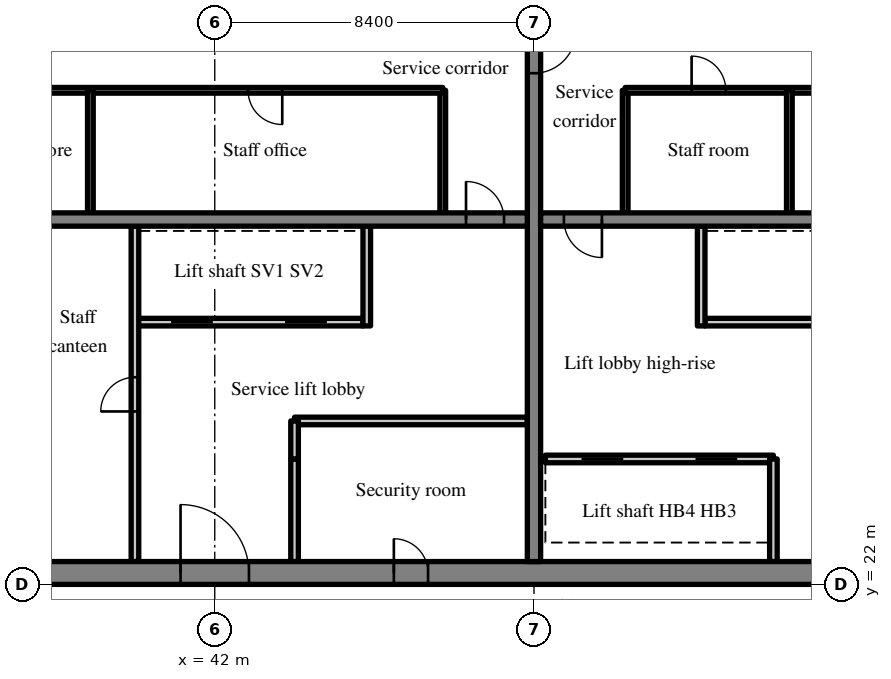
"""IFC4 building model, lengths in metres.
Left out: names, types, materials, properties, quantities, classifications, styles, units other than length and angle.
Written with IfcOpenShell. Run it as: python <this file> out.ifc"""

import sys

from ifc_helpers import new_model, si_unit, direction, frame, frame_2d, origin, place, context, subcontext, project, spatial, rectangle, extrude, source, transform, mapped, element, fill, save


model = new_model("IFC4")
c1 = context("Model", 3, precision=1e-05, world=origin(), true_north=direction((0.0, 1.0)))
c2 = subcontext(c1, "Body", "Model", "MODEL_VIEW")
j1 = project(units=[si_unit("LENGTHUNIT", "METRE"), si_unit("PLANEANGLEUNIT", "RADIAN")], contexts=[c1])
p1 = place(None, origin())
s1 = spatial("IfcSite", under=j1, at=p1, CompositionType="ELEMENT")
p2 = place(p1, origin())
s2 = spatial("IfcBuilding", under=s1, at=p2, CompositionType="ELEMENT")
p3 = place(p2, frame((0.0, 0.0, 221.8)))
s3 = spatial("IfcBuildingStorey", under=s2, at=p3, CompositionType="ELEMENT", Elevation=221.8)
m1 = source(origin(), c2, "Body", "SweptSolid", [
    extrude(rectangle(XDim=50.4, YDim=0.6, at=frame_2d((25.2, 0.0))), origin(), (0.0, 0.0, 1.0), 3.62),
])
p4 = place(p3, frame((25.2, 22.3, 0.0), z_axis=(0.0, 0.0, 1.0), x_axis=(1.0, 0.0, 0.0)))
e1 = element("IfcWall", 1, at=p4, inside=s3, PredefinedType="SHEAR", context=c2, shape_type="MappedRepresentation", body=[
    mapped(m1, transform((0.0, 0.0, 0.0), scale=1.0)),
])
m2 = source(origin(), c2, "Body", "SweptSolid", [
    extrude(rectangle(XDim=1.8, YDim=2.1, at=frame_2d((0.9, 1.05))), frame((0.0, 0.31, 0.0), z_axis=(0.0, -1.0, 0.0), x_axis=(1.0, 0.0, 0.0)), (0.0, 0.0, 1.0), 0.62),
])
p5 = place(p4, frame((15.9, 0.0, 0.0)))
e2 = element("IfcOpeningElement", 2, at=p5, cuts=e1, PredefinedType="OPENING", context=c2, shape_type="MappedRepresentation", body=[
    mapped(m2, transform((0.0, 0.0, 0.0), scale=1.0)),
])
m3 = source(origin(), c2, "Body", "SweptSolid", [
    extrude(rectangle(XDim=0.9, YDim=2.1, at=frame_2d((0.45, 1.05))), frame((0.0, 0.31, 0.0), z_axis=(0.0, -1.0, 0.0), x_axis=(1.0, 0.0, 0.0)), (0.0, 0.0, 1.0), 0.62),
])
p6 = place(p4, frame((9.687, 0.0, 0.0)))
e3 = element("IfcOpeningElement", 3, at=p6, cuts=e1, PredefinedType="OPENING", context=c2, shape_type="MappedRepresentation", body=[
    mapped(m3, transform((0.0, 0.0, 0.0), scale=1.0)),
])
p7 = place(p4, frame((21.513, 0.0, 0.0)))
e4 = element("IfcOpeningElement", 4, at=p7, cuts=e1, PredefinedType="OPENING", context=c2, shape_type="MappedRepresentation", body=[
    mapped(m3, transform((0.0, 0.0, 0.0), scale=1.0)),
])
p8 = place(p4, frame((32.7, 0.0, 0.0)))
e5 = element("IfcOpeningElement", 5, at=p8, cuts=e1, PredefinedType="OPENING", context=c2, shape_type="MappedRepresentation", body=[
    mapped(m2, transform((0.0, 0.0, 0.0), scale=1.0)),
])
m4 = source(origin(), c2, "Body", "SweptSolid", [
    extrude(rectangle(XDim=1.2, YDim=2.1, at=frame_2d((0.6, 1.05))), frame((0.0, 0.31, 0.0), z_axis=(0.0, -1.0, 0.0), x_axis=(1.0, 0.0, 0.0)), (0.0, 0.0, 1.0), 0.62),
])
p9 = place(p4, frame((6.488, 0.0, 0.0)))
e6 = element("IfcOpeningElement", 6, at=p9, cuts=e1, PredefinedType="OPENING", context=c2, shape_type="MappedRepresentation", body=[
    mapped(m4, transform((0.0, 0.0, 0.0), scale=1.0)),
])
p10 = place(p4, frame((47.925, 0.0, 0.0)))
e7 = element("IfcOpeningElement", 7, at=p10, cuts=e1, PredefinedType="OPENING", context=c2, shape_type="MappedRepresentation", body=[
    mapped(m4, transform((0.0, 0.0, 0.0), scale=1.0)),
])
m5 = source(origin(), c2, "Body", "SweptSolid", [
    extrude(rectangle(XDim=18.8, YDim=0.35, at=frame_2d((9.4, 0.0))), origin(), (0.0, 0.0, 1.0), 3.62),
])
p11 = place(p3, frame((50.4, 22.6, 0.0), z_axis=(0.0, 0.0, 1.0), x_axis=(0.0, 1.0, 0.0)))
e8 = element("IfcWall", 8, at=p11, inside=s3, PredefinedType="SHEAR", context=c2, shape_type="MappedRepresentation", body=[
    mapped(m5, transform((0.0, 0.0, 0.0), scale=1.0)),
])
m6 = source(origin(), c2, "Body", "SweptSolid", [
    extrude(rectangle(XDim=1.1, YDim=2.1, at=frame_2d((0.55, 1.05))), frame((0.0, 0.185, 0.0), z_axis=(0.0, -1.0, 0.0), x_axis=(1.0, 0.0, 0.0)), (0.0, 0.0, 1.0), 0.37),
])
p12 = place(p11, frame((12.85, 0.0, 0.0)))
e9 = element("IfcOpeningElement", 9, at=p12, cuts=e8, PredefinedType="OPENING", context=c2, shape_type="MappedRepresentation", body=[
    mapped(m6, transform((0.0, 0.0, 0.0), scale=1.0)),
])
m7 = source(origin(), c2, "Body", "SweptSolid", [
    extrude(rectangle(XDim=16.45, YDim=0.35, at=frame_2d((8.225, 0.0))), origin(), (0.0, 0.0, 1.0), 3.62),
])
p13 = place(p3, frame((33.775, 31.6, 0.0), z_axis=(0.0, 0.0, 1.0), x_axis=(1.0, 0.0, 0.0)))
e10 = element("IfcWall", 10, at=p13, inside=s3, PredefinedType="SHEAR", context=c2, shape_type="MappedRepresentation", body=[
    mapped(m7, transform((0.0, 0.0, 0.0), scale=1.0)),
])
m8 = source(origin(), c2, "Body", "SweptSolid", [
    extrude(rectangle(XDim=1.0, YDim=2.1, at=frame_2d((0.5, 1.05))), frame((0.0, 0.185, 0.0), z_axis=(0.0, -1.0, 0.0), x_axis=(1.0, 0.0, 0.0)), (0.0, 0.0, 1.0), 0.37),
])
p14 = place(p13, frame((14.837, 0.0, 0.0)))
e11 = element("IfcOpeningElement", 11, at=p14, cuts=e10, PredefinedType="OPENING", context=c2, shape_type="MappedRepresentation", body=[
    mapped(m8, transform((0.0, 0.0, 0.0), scale=1.0)),
])
m9 = source(origin(), c2, "Body", "SweptSolid", [
    extrude(rectangle(XDim=16.45, YDim=0.35, at=frame_2d((8.225, 0.0))), origin(), (0.0, 0.0, 1.0), 3.62),
])
p15 = place(p3, frame((50.575, 31.6, 0.0), z_axis=(0.0, 0.0, 1.0), x_axis=(1.0, 0.0, 0.0)))
e12 = element("IfcWall", 12, at=p15, inside=s3, PredefinedType="SHEAR", context=c2, shape_type="MappedRepresentation", body=[
    mapped(m9, transform((0.0, 0.0, 0.0), scale=1.0)),
])
p16 = place(p15, frame((0.613, 0.0, 0.0)))
e13 = element("IfcOpeningElement", 13, at=p16, cuts=e12, PredefinedType="OPENING", context=c2, shape_type="MappedRepresentation", body=[
    mapped(m8, transform((0.0, 0.0, 0.0), scale=1.0)),
])
m10 = source(origin(), c2, "Body", "SweptSolid", [
    extrude(rectangle(XDim=6.0, YDim=0.2, at=frame_2d((3.0, 0.0))), origin(), (0.0, 0.0, 1.0), 3.62),
])
p17 = place(p3, frame((39.9, 28.9, 0.0), z_axis=(0.0, 0.0, 1.0), x_axis=(1.0, 0.0, 0.0)))
e14 = element("IfcWall", 14, at=p17, inside=s3, PredefinedType="SOLIDWALL", context=c2, shape_type="MappedRepresentation", body=[
    mapped(m10, transform((0.0, 0.0, 0.0), scale=1.0)),
])
m11 = source(origin(), c2, "Body", "SweptSolid", [
    extrude(rectangle(XDim=1.1, YDim=2.1, at=frame_2d((0.55, 1.05))), frame((0.0, 0.11, 0.0), z_axis=(0.0, -1.0, 0.0), x_axis=(1.0, 0.0, 0.0)), (0.0, 0.0, 1.0), 0.22),
])
p18 = place(p17, frame((0.95, 0.0, 0.0)))
e15 = element("IfcOpeningElement", 15, at=p18, cuts=e14, PredefinedType="OPENING", context=c2, shape_type="MappedRepresentation", body=[
    mapped(m11, transform((0.0, 0.0, 0.0), scale=1.0)),
])
p19 = place(p17, frame((3.95, 0.0, 0.0)))
e16 = element("IfcOpeningElement", 16, at=p19, cuts=e14, PredefinedType="OPENING", context=c2, shape_type="MappedRepresentation", body=[
    mapped(m11, transform((0.0, 0.0, 0.0), scale=1.0)),
])
m12 = source(origin(), c2, "Body", "SweptSolid", [
    extrude(rectangle(XDim=8.825, YDim=0.2, at=frame_2d((4.413, 0.0))), origin(), (0.0, 0.0, 1.0), 3.62),
])
p20 = place(p3, frame((39.9, 22.6, 0.0), z_axis=(0.0, 0.0, 1.0), x_axis=(0.0, 1.0, 0.0)))
e17 = element("IfcWall", 17, at=p20, inside=s3, PredefinedType="PARTITIONING", context=c2, shape_type="MappedRepresentation", body=[
    mapped(m12, transform((0.0, 0.0, 0.0), scale=1.0)),
])
m13 = source(origin(), c2, "Body", "SweptSolid", [
    extrude(rectangle(XDim=0.9, YDim=2.1, at=frame_2d((0.45, 1.05))), frame((0.0, 0.11, 0.0), z_axis=(0.0, -1.0, 0.0), x_axis=(1.0, 0.0, 0.0)), (0.0, 0.0, 1.0), 0.22),
])
p21 = place(p20, frame((3.95, 0.0, 0.0)))
e18 = element("IfcOpeningElement", 18, at=p21, cuts=e17, PredefinedType="OPENING", context=c2, shape_type="MappedRepresentation", body=[
    mapped(m13, transform((0.0, 0.0, 0.0), scale=1.0)),
])
m14 = source(origin(), c2, "Body", "SweptSolid", [
    extrude(rectangle(XDim=2.7, YDim=0.2, at=frame_2d((1.35, 0.0))), origin(), (0.0, 0.0, 1.0), 3.62),
])
p22 = place(p3, frame((44.1, 22.6, 0.0), z_axis=(0.0, 0.0, 1.0), x_axis=(0.0, 1.0, 0.0)))
e19 = element("IfcWall", 19, at=p22, inside=s3, PredefinedType="PARTITIONING", context=c2, shape_type="MappedRepresentation", body=[
    mapped(m14, transform((0.0, 0.0, 0.0), scale=1.0)),
])
m15 = source(origin(), c2, "Body", "SweptSolid", [
    extrude(rectangle(XDim=2.625, YDim=0.2, at=frame_2d((1.312, 0.0))), origin(), (0.0, 0.0, 1.0), 3.62),
])
p23 = place(p3, frame((46.0, 28.8, 0.0), z_axis=(0.0, 0.0, 1.0), x_axis=(0.0, 1.0, 0.0)))
e20 = element("IfcWall", 20, at=p23, inside=s3, PredefinedType="SOLIDWALL", context=c2, shape_type="MappedRepresentation", body=[
    mapped(m15, transform((0.0, 0.0, 0.0), scale=1.0)),
])
m16 = source(origin(), c2, "Body", "SweptSolid", [
    extrude(rectangle(XDim=6.125, YDim=0.2, at=frame_2d((3.062, 0.0))), origin(), (0.0, 0.0, 1.0), 3.62),
])
p24 = place(p3, frame((44.1, 26.3, 0.0), z_axis=(0.0, 0.0, 1.0), x_axis=(1.0, 0.0, 0.0)))
e21 = element("IfcWall", 21, at=p24, inside=s3, PredefinedType="PARTITIONING", context=c2, shape_type="MappedRepresentation", body=[
    mapped(m16, transform((0.0, 0.0, 0.0), scale=1.0)),
])
m17 = source(origin(), c2, "Body", "SweptSolid", [
    extrude(rectangle(XDim=1.0, YDim=0.2, at=frame_2d((0.5, 0.0))), origin(), (0.0, 0.0, 1.0), 3.62),
])
p25 = place(p3, frame((44.1, 25.3, 0.0), z_axis=(0.0, 0.0, 1.0), x_axis=(0.0, 1.0, 0.0)))
e22 = element("IfcWall", 22, at=p25, inside=s3, PredefinedType="PARTITIONING", context=c2, shape_type="MappedRepresentation", body=[
    mapped(m17, transform((0.0, 0.0, 0.0), scale=1.0)),
])
m18 = source(origin(), c2, "Body", "SweptSolid", [
    extrude(rectangle(XDim=3.225, YDim=0.15, at=frame_2d((1.613, 0.0))), origin(), (0.0, 0.0, 1.0), 3.62),
])
p26 = place(p3, frame((48.0, 31.775, 0.0), z_axis=(0.0, 0.0, 1.0), x_axis=(0.0, 1.0, 0.0)))
e23 = element("IfcWall", 23, at=p26, inside=s3, PredefinedType="PARTITIONING", context=c2, shape_type="MappedRepresentation", body=[
    mapped(m18, transform((0.0, 0.0, 0.0), scale=1.0)),
])
m19 = source(origin(), c2, "Body", "SweptSolid", [
    extrude(rectangle(XDim=14.225, YDim=0.15, at=frame_2d((7.113, 0.0))), origin(), (0.0, 0.0, 1.0), 3.62),
])
p27 = place(p3, frame((33.775, 35.0, 0.0), z_axis=(0.0, 0.0, 1.0), x_axis=(1.0, 0.0, 0.0)))
e24 = element("IfcWall", 24, at=p27, inside=s3, PredefinedType="PARTITIONING", context=c2, shape_type="MappedRepresentation", body=[
    mapped(m19, transform((0.0, 0.0, 0.0), scale=1.0)),
])
m20 = source(origin(), c2, "Body", "SweptSolid", [
    extrude(rectangle(XDim=0.9, YDim=2.1, at=frame_2d((0.45, 1.05))), frame((0.0, 0.085, 0.0), z_axis=(0.0, -1.0, 0.0), x_axis=(1.0, 0.0, 0.0)), (0.0, 0.0, 1.0), 0.17),
])
p28 = place(p27, frame((2.026, 0.0, 0.0)))
e25 = element("IfcOpeningElement", 25, at=p28, cuts=e24, PredefinedType="OPENING", context=c2, shape_type="MappedRepresentation", body=[
    mapped(m20, transform((0.0, 0.0, 0.0), scale=1.0)),
])
p29 = place(p27, frame((9.101, 0.0, 0.0)))
e26 = element("IfcOpeningElement", 26, at=p29, cuts=e24, PredefinedType="OPENING", context=c2, shape_type="MappedRepresentation", body=[
    mapped(m20, transform((0.0, 0.0, 0.0), scale=1.0)),
])
p30 = place(p3, frame((38.727, 31.775, 0.0), z_axis=(0.0, 0.0, 1.0), x_axis=(0.0, 1.0, 0.0)))
e27 = element("IfcWall", 27, at=p30, inside=s3, PredefinedType="PARTITIONING", context=c2, shape_type="MappedRepresentation", body=[
    mapped(m18, transform((0.0, 0.0, 0.0), scale=1.0)),
])
p31 = place(p3, frame((56.7, 25.3, 0.0), z_axis=(0.0, 0.0, 1.0), x_axis=(-1.0, 0.0, 0.0)))
e28 = element("IfcWall", 28, at=p31, inside=s3, PredefinedType="SOLIDWALL", context=c2, shape_type="MappedRepresentation", body=[
    mapped(m10, transform((0.0, 0.0, 0.0), scale=1.0)),
])
p32 = place(p31, frame((0.95, 0.0, 0.0)))
e29 = element("IfcOpeningElement", 29, at=p32, cuts=e28, PredefinedType="OPENING", context=c2, shape_type="MappedRepresentation", body=[
    mapped(m11, transform((0.0, 0.0, 0.0), scale=1.0)),
])
p33 = place(p31, frame((3.95, 0.0, 0.0)))
e30 = element("IfcOpeningElement", 30, at=p33, cuts=e28, PredefinedType="OPENING", context=c2, shape_type="MappedRepresentation", body=[
    mapped(m11, transform((0.0, 0.0, 0.0), scale=1.0)),
])
m21 = source(origin(), c2, "Body", "SweptSolid", [
    extrude(rectangle(XDim=12.125, YDim=0.2, at=frame_2d((6.062, 0.0))), origin(), (0.0, 0.0, 1.0), 3.62),
])
p34 = place(p3, frame((67.025, 28.9, 0.0), z_axis=(0.0, 0.0, 1.0), x_axis=(-1.0, 0.0, 0.0)))
e31 = element("IfcWall", 31, at=p34, inside=s3, PredefinedType="SOLIDWALL", context=c2, shape_type="MappedRepresentation", body=[
    mapped(m21, transform((0.0, 0.0, 0.0), scale=1.0)),
])
p35 = place(p34, frame((1.075, 0.0, 0.0)))
e32 = element("IfcOpeningElement", 32, at=p35, cuts=e31, PredefinedType="OPENING", context=c2, shape_type="MappedRepresentation", body=[
    mapped(m11, transform((0.0, 0.0, 0.0), scale=1.0)),
])
p36 = place(p34, frame((4.075, 0.0, 0.0)))
e33 = element("IfcOpeningElement", 33, at=p36, cuts=e31, PredefinedType="OPENING", context=c2, shape_type="MappedRepresentation", body=[
    mapped(m11, transform((0.0, 0.0, 0.0), scale=1.0)),
])
p37 = place(p3, frame((56.7, 22.6, 0.0), z_axis=(0.0, 0.0, 1.0), x_axis=(0.0, 1.0, 0.0)))
e34 = element("IfcWall", 34, at=p37, inside=s3, PredefinedType="SOLIDWALL", context=c2, shape_type="MappedRepresentation", body=[
    mapped(m14, transform((0.0, 0.0, 0.0), scale=1.0)),
])
p38 = place(p3, frame((54.8, 28.8, 0.0), z_axis=(0.0, 0.0, 1.0), x_axis=(0.0, 1.0, 0.0)))
e35 = element("IfcWall", 35, at=p38, inside=s3, PredefinedType="SOLIDWALL", context=c2, shape_type="MappedRepresentation", body=[
    mapped(m15, transform((0.0, 0.0, 0.0), scale=1.0)),
])
p39 = place(p3, frame((52.8, 31.775, 0.0), z_axis=(0.0, 0.0, 1.0), x_axis=(0.0, 1.0, 0.0)))
e36 = element("IfcWall", 36, at=p39, inside=s3, PredefinedType="PARTITIONING", context=c2, shape_type="MappedRepresentation", body=[
    mapped(m18, transform((0.0, 0.0, 0.0), scale=1.0)),
])
m22 = source(origin(), c2, "Body", "SweptSolid", [
    extrude(rectangle(XDim=14.225, YDim=0.15, at=frame_2d((7.112, 0.0))), origin(), (0.0, 0.0, 1.0), 3.62),
])
p40 = place(p3, frame((67.025, 35.0, 0.0), z_axis=(0.0, 0.0, 1.0), x_axis=(-1.0, 0.0, 0.0)))
e37 = element("IfcWall", 37, at=p40, inside=s3, PredefinedType="PARTITIONING", context=c2, shape_type="MappedRepresentation", body=[
    mapped(m22, transform((0.0, 0.0, 0.0), scale=1.0)),
])
p41 = place(p40, frame((0.965, 0.0, 0.0)))
e38 = element("IfcOpeningElement", 38, at=p41, cuts=e37, PredefinedType="OPENING", context=c2, shape_type="MappedRepresentation", body=[
    mapped(m20, transform((0.0, 0.0, 0.0), scale=1.0)),
])
p42 = place(p40, frame((5.918, 0.0, 0.0)))
e39 = element("IfcOpeningElement", 39, at=p42, cuts=e37, PredefinedType="OPENING", context=c2, shape_type="MappedRepresentation", body=[
    mapped(m20, transform((0.0, 0.0, 0.0), scale=1.0)),
])
p43 = place(p40, frame((11.577, 0.0, 0.0)))
e40 = element("IfcOpeningElement", 40, at=p43, cuts=e37, PredefinedType="OPENING", context=c2, shape_type="MappedRepresentation", body=[
    mapped(m20, transform((0.0, 0.0, 0.0), scale=1.0)),
])
p44 = place(p3, frame((57.12, 31.775, 0.0), z_axis=(0.0, 0.0, 1.0), x_axis=(0.0, 1.0, 0.0)))
e41 = element("IfcWall", 41, at=p44, inside=s3, PredefinedType="PARTITIONING", context=c2, shape_type="MappedRepresentation", body=[
    mapped(m18, transform((0.0, 0.0, 0.0), scale=1.0)),
])
m23 = source(origin(), c2, "Body", "SweptSolid", [
    extrude(rectangle(XDim=1.8, YDim=2.1, at=frame_2d((0.9, 1.05))), frame((0.0, 0.225, 0.0), z_axis=(0.0, -1.0, 0.0), x_axis=(1.0, 0.0, 0.0)), (0.0, 0.0, 1.0), 0.05),
])
p45 = place(p5, origin())
e42 = element("IfcDoor", 42, at=p45, inside=s3, OperationType="DOUBLE_DOOR_SINGLE_SWING", PredefinedType="DOOR", context=c2, shape_type="MappedRepresentation", body=[
    mapped(m23, transform((0.0, 0.0, 0.0), scale=1.0)),
])
fill(e2, e42)
m24 = source(origin(), c2, "Body", "SweptSolid", [
    extrude(rectangle(XDim=1.0, YDim=2.1, at=frame_2d((0.5, 1.05))), frame((0.0, 0.025, 0.0), z_axis=(0.0, -1.0, 0.0), x_axis=(1.0, 0.0, 0.0)), (0.0, 0.0, 1.0), 0.05),
])
p46 = place(p14, origin())
e43 = element("IfcDoor", 43, at=p46, inside=s3, OperationType="SINGLE_SWING_LEFT", PredefinedType="DOOR", context=c2, shape_type="MappedRepresentation", body=[
    mapped(m24, transform((0.0, 0.0, 0.0), scale=1.0)),
])
fill(e11, e43)
m25 = source(origin(), c2, "Body", "SweptSolid", [
    extrude(rectangle(XDim=1.1, YDim=2.1, at=frame_2d((0.55, 1.05))), frame((0.0, 0.025, 0.0), z_axis=(0.0, -1.0, 0.0), x_axis=(1.0, 0.0, 0.0)), (0.0, 0.0, 1.0), 0.05),
])
p47 = place(p18, origin())
e44 = element("IfcDoor", 44, at=p47, inside=s3, OperationType="SLIDING_TO_LEFT", PredefinedType="DOOR", context=c2, shape_type="MappedRepresentation", body=[
    mapped(m25, transform((0.0, 0.0, 0.0), scale=1.0)),
])
fill(e15, e44)
p48 = place(p19, origin())
e45 = element("IfcDoor", 45, at=p48, inside=s3, OperationType="SLIDING_TO_RIGHT", PredefinedType="DOOR", context=c2, shape_type="MappedRepresentation", body=[
    mapped(m25, transform((0.0, 0.0, 0.0), scale=1.0)),
])
fill(e16, e45)
m26 = source(origin(), c2, "Body", "SweptSolid", [
    extrude(rectangle(XDim=0.9, YDim=2.1, at=frame_2d((0.45, 1.05))), frame((0.0, 0.025, 0.0), z_axis=(0.0, -1.0, 0.0), x_axis=(1.0, 0.0, 0.0)), (0.0, 0.0, 1.0), 0.05),
])
p49 = place(p21, origin())
e46 = element("IfcDoor", 46, at=p49, inside=s3, OperationType="SINGLE_SWING_LEFT", PredefinedType="DOOR", context=c2, shape_type="MappedRepresentation", body=[
    mapped(m26, transform((0.0, 0.0, 0.0), scale=1.0)),
])
fill(e18, e46)
m27 = source(origin(), c2, "Body", "SweptSolid", [
    extrude(rectangle(XDim=0.9, YDim=2.1, at=frame_2d((0.45, 1.05))), frame((0.0, 0.225, 0.0), z_axis=(0.0, -1.0, 0.0), x_axis=(1.0, 0.0, 0.0)), (0.0, 0.0, 1.0), 0.05),
])
p50 = place(p7, origin())
e47 = element("IfcDoor", 47, at=p50, inside=s3, OperationType="SINGLE_SWING_LEFT", PredefinedType="DOOR", context=c2, shape_type="MappedRepresentation", body=[
    mapped(m27, transform((0.0, 0.0, 0.0), scale=1.0)),
])
fill(e4, e47)
p51 = place(p29, origin())
e48 = element("IfcDoor", 48, at=p51, inside=s3, OperationType="SINGLE_SWING_RIGHT", PredefinedType="DOOR", context=c2, shape_type="MappedRepresentation", body=[
    mapped(m26, transform((0.0, 0.0, 0.0), scale=1.0)),
])
fill(e26, e48)
p52 = place(p16, origin())
e49 = element("IfcDoor", 49, at=p52, inside=s3, OperationType="SINGLE_SWING_RIGHT", PredefinedType="DOOR", context=c2, shape_type="MappedRepresentation", body=[
    mapped(m24, transform((0.0, 0.0, 0.0), scale=1.0)),
])
fill(e13, e49)
p53 = place(p32, origin())
e50 = element("IfcDoor", 50, at=p53, inside=s3, OperationType="SLIDING_TO_RIGHT", PredefinedType="DOOR", context=c2, shape_type="MappedRepresentation", body=[
    mapped(m25, transform((0.0, 0.0, 0.0), scale=1.0)),
])
fill(e29, e50)
p54 = place(p33, origin())
e51 = element("IfcDoor", 51, at=p54, inside=s3, OperationType="SLIDING_TO_LEFT", PredefinedType="DOOR", context=c2, shape_type="MappedRepresentation", body=[
    mapped(m25, transform((0.0, 0.0, 0.0), scale=1.0)),
])
fill(e30, e51)
p55 = place(p43, origin())
e52 = element("IfcDoor", 52, at=p55, inside=s3, OperationType="SINGLE_SWING_RIGHT", PredefinedType="DOOR", context=c2, shape_type="MappedRepresentation", body=[
    mapped(m26, transform((0.0, 0.0, 0.0), scale=1.0)),
])
fill(e40, e52)
p56 = place(p12, origin())
e53 = element("IfcDoor", 53, at=p56, inside=s3, OperationType="SINGLE_SWING_RIGHT", PredefinedType="DOOR", context=c2, shape_type="MappedRepresentation", body=[
    mapped(m25, transform((0.0, 0.0, 0.0), scale=1.0)),
])
fill(e9, e53)
save(model, sys.argv[1])
